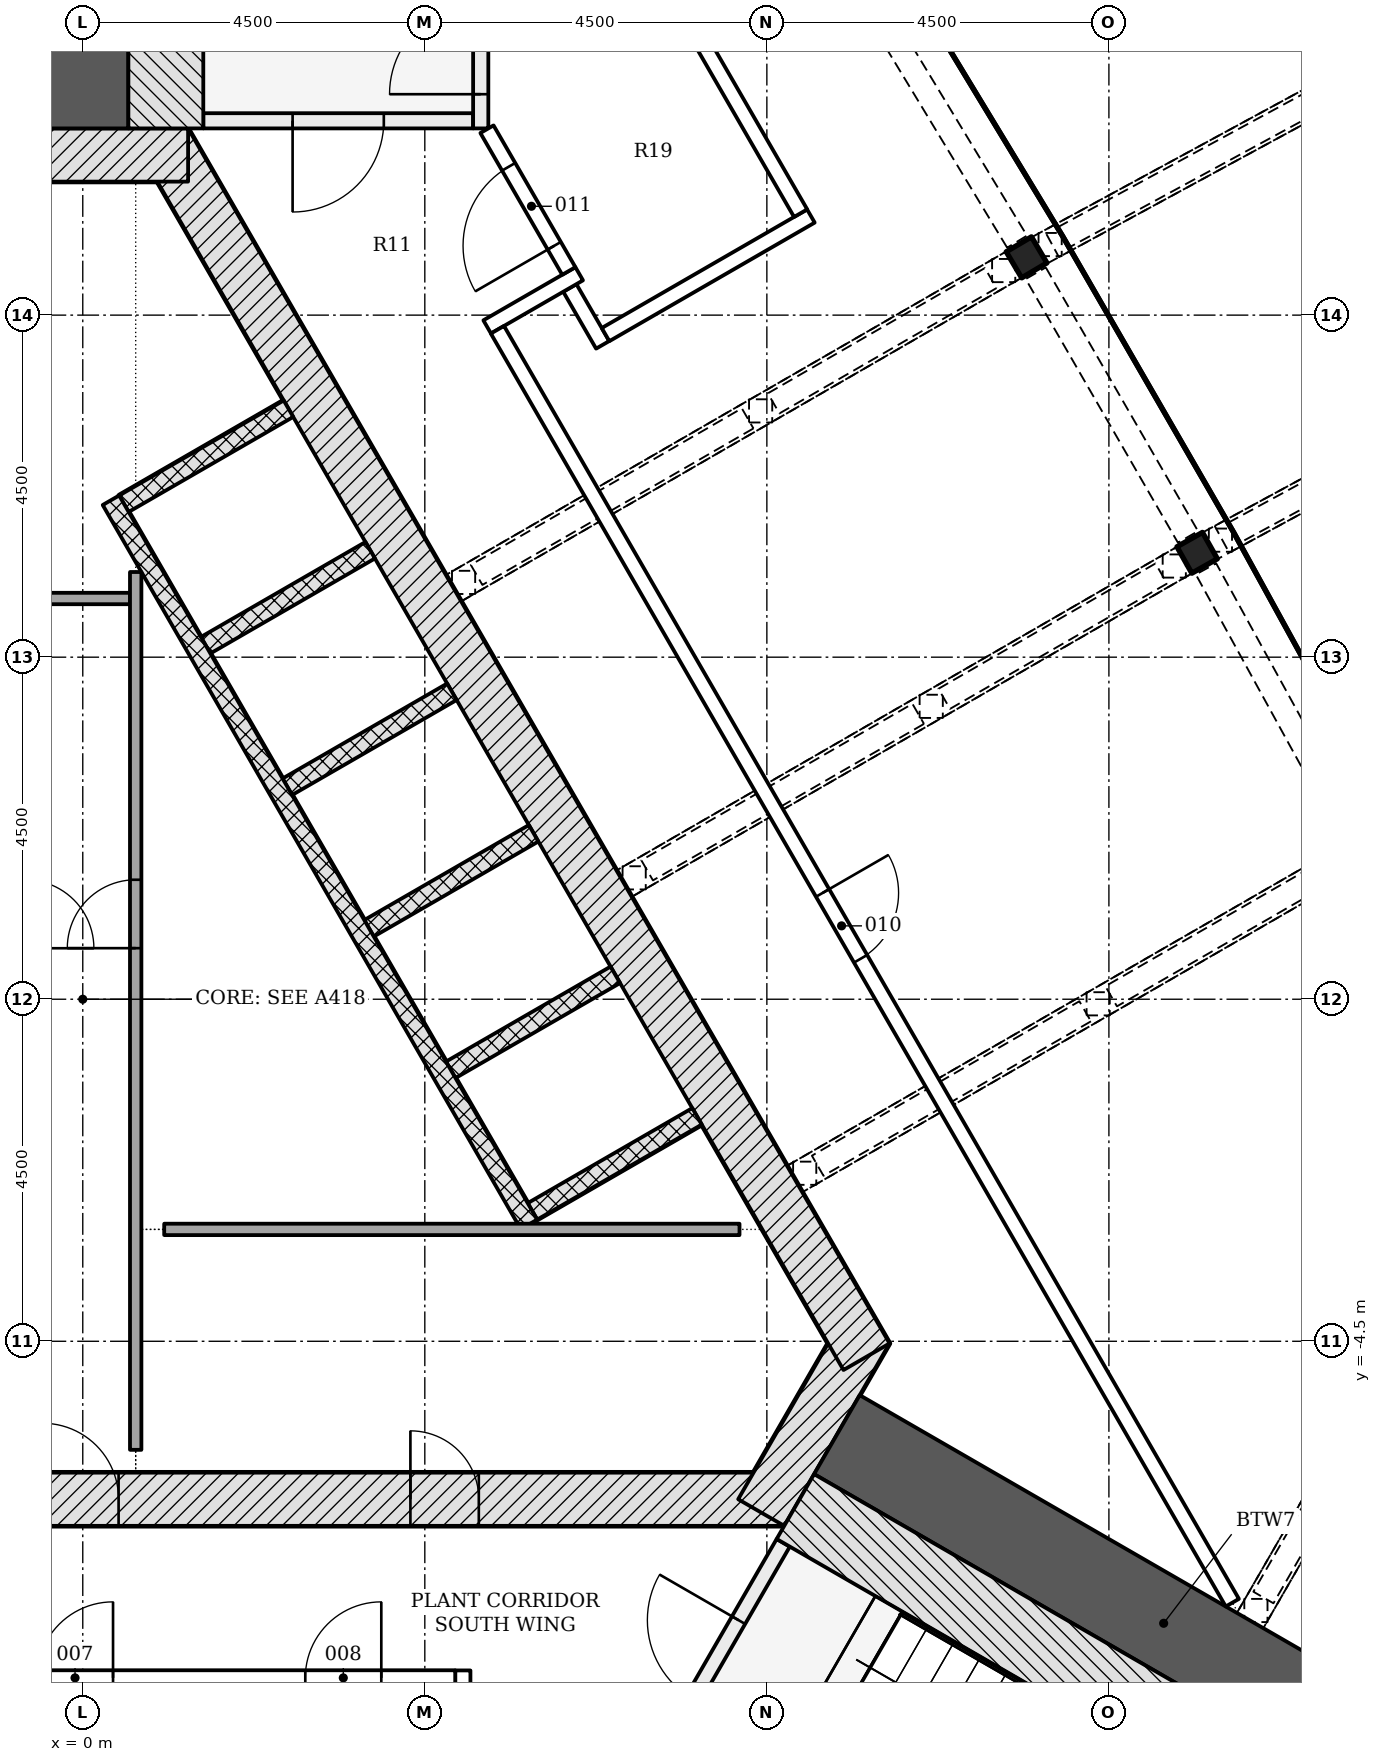
"""IFC4 building model, lengths in metres.
Left out: names, types, materials, properties, quantities, classifications, styles, units other than length and angle.
Written with IfcOpenShell. Run it as: python <this file> out.ifc"""

import sys

from ifc_helpers import new_model, si_unit, direction, frame, frame_2d, origin, origin_2d, place, context, subcontext, project, spatial, polyline, rectangle, i_section, outline, extrude, element, fill, save


model = new_model("IFC4")
c1 = context("Model", 3, precision=1e-05, world=origin(), true_north=direction((0.0, 1.0)))
c2 = subcontext(c1, "Body", "Model", "MODEL_VIEW")
j1 = project(units=[si_unit("LENGTHUNIT", "METRE"), si_unit("PLANEANGLEUNIT", "RADIAN")], contexts=[c1])
p1 = place(None, origin())
s1 = spatial("IfcSite", under=j1, at=p1, CompositionType="ELEMENT")
p2 = place(p1, origin())
s2 = spatial("IfcBuilding", under=s1, at=p2, CompositionType="ELEMENT")
p3 = place(p2, frame((0.0, 0.0, 168.9)))
s3 = spatial("IfcBuildingStorey", under=s2, at=p3, CompositionType="ELEMENT", Elevation=168.9)
p4 = place(p3, frame((-9.229, -6.578, -0.3), z_axis=(0.0, 0.0, 1.0), x_axis=(1.0, 0.0, 0.0)))
e1 = element("IfcWall", 1, at=p4, inside=s3, PredefinedType="SHEAR", context=c2, shape_type="SweptSolid", body=[
    extrude(rectangle(XDim=18.458, YDim=0.7, at=frame_2d((9.229, 0.0))), origin(), (0.0, 0.0, 1.0), 5.5),
])
p5 = place(p4, frame((8.7, 0.0, 0.3)))
e2 = element("IfcOpeningElement", 2, at=p5, cuts=e1, PredefinedType="OPENING", context=c2, shape_type="SweptSolid", body=[
    extrude(rectangle(XDim=1.0, YDim=2.1, at=frame_2d((0.5, 1.05))), frame((0.0, 0.36, 0.0), z_axis=(0.0, -1.0, 0.0), x_axis=(1.0, 0.0, 0.0)), (0.0, 0.0, 1.0), 0.72),
])
p6 = place(p4, frame((3.99, 0.0, 0.3)))
e3 = element("IfcOpeningElement", 3, at=p6, cuts=e1, PredefinedType="OPENING", context=c2, shape_type="SweptSolid", body=[
    extrude(rectangle(XDim=0.9, YDim=2.1, at=frame_2d((0.45, 1.05))), frame((0.0, 0.36, 0.0), z_axis=(0.0, -1.0, 0.0), x_axis=(1.0, 0.0, 0.0)), (0.0, 0.0, 1.0), 0.72),
])
p7 = place(p4, frame((13.539, 0.0, 0.3)))
e4 = element("IfcOpeningElement", 4, at=p7, cuts=e1, PredefinedType="OPENING", context=c2, shape_type="SweptSolid", body=[
    extrude(rectangle(XDim=0.9, YDim=2.1, at=frame_2d((0.45, 1.05))), frame((0.0, 0.36, 0.0), z_axis=(0.0, -1.0, 0.0), x_axis=(1.0, 0.0, 0.0)), (0.0, 0.0, 1.0), 0.72),
])
p8 = place(p3, frame((8.926, -6.753, -0.3), z_axis=(0.0, 0.0, 1.0), x_axis=(0.500042739161, 0.866000726912, 0.0)))
e5 = element("IfcWall", 5, at=p8, inside=s3, PredefinedType="SHEAR", context=c2, shape_type="SweptSolid", body=[
    extrude(rectangle(XDim=2.771, YDim=0.7, at=frame_2d((1.386, 0.0))), origin(), (0.0, 0.0, 1.0), 5.5),
])
p9 = place(p3, frame((10.311, -4.703, -0.3), z_axis=(0.0, 0.0, 1.0), x_axis=(-0.500001446645, 0.866024568562, 0.0)))
e6 = element("IfcWall", 6, at=p9, inside=s3, PredefinedType="SHEAR", context=c2, shape_type="SweptSolid", body=[
    extrude(rectangle(XDim=18.458, YDim=0.7, at=frame_2d((9.229, 0.0))), origin(), (0.0, 0.0, 1.0), 5.5),
])
p10 = place(p3, frame((1.386, 11.106, -0.3), z_axis=(0.0, 0.0, 1.0), x_axis=(-1.0, 0.0, 0.0)))
e7 = element("IfcWall", 7, at=p10, inside=s3, PredefinedType="SHEAR", context=c2, shape_type="SweptSolid", body=[
    extrude(rectangle(XDim=2.771, YDim=0.7, at=frame_2d((1.386, 0.0))), origin(), (0.0, 0.0, 1.0), 5.5),
])
p11 = place(p3, frame((0.0, 11.456, -0.3), z_axis=(0.0, 0.0, 1.0), x_axis=(0.0, 1.0, 0.0)))
e8 = element("IfcWall", 8, at=p11, inside=s3, PredefinedType="SHEAR", context=c2, shape_type="SweptSolid", body=[
    extrude(rectangle(XDim=9.928, YDim=1.2, at=frame_2d((4.964, 0.0))), origin(), (0.0, 0.0, 1.0), 5.5),
])
p12 = place(p3, frame((9.922, -5.728, -0.3), z_axis=(0.0, 0.0, 1.0), x_axis=(0.866029553954, -0.499992811627, 0.0)))
e9 = element("IfcWall", 9, at=p12, inside=s3, PredefinedType="SHEAR", context=c2, shape_type="SweptSolid", body=[
    extrude(rectangle(XDim=9.927, YDim=1.2, at=frame_2d((4.964, 0.0))), origin(), (0.0, 0.0, 1.0), 5.5),
])
for number, where, z_axis, x_axis in (
    (10, (14.661, 5.873, -0.3), (0.0, 0.0, 1.0), (-0.491, 0.871, 0.0)),
    (11, (12.417, 9.76, -0.3), (0.0, 0.0, 1.0), (-0.509, 0.861, 0.0)),
):
    element("IfcColumn", number, at=place(p3, frame(where, z_axis=z_axis, x_axis=x_axis)), inside=s3, PredefinedType="COLUMN", context=c2, shape_type="SweptSolid", body=[
        extrude(i_section(OverallWidth=0.399, OverallDepth=0.386, WebThickness=0.021, FlangeThickness=0.033, FilletRadius=0.015, at=origin_2d()), origin(), (0.0, 0.0, 1.0), 5.5),
    ])
p13 = place(p3, origin())
e12 = element("IfcWall", 12, at=p13, inside=s3, PredefinedType="NOTDEFINED", context=c2, shape_type="SweptSolid", body=[
    extrude(outline(polyline([(15.736, -15.612), (17.768, -15.451), (19.234, -15.121), (20.555, -14.405), (21.632, -13.357), (22.383, -12.055), (22.753, -10.599), (22.712, -9.097), (22.265, -7.662), (21.979, -7.751), (22.413, -9.146), (22.452, -10.565), (22.103, -11.941), (21.393, -13.171), (20.376, -14.161), (19.128, -14.837), (17.723, -15.154), (15.712, -15.312), (15.736, -15.612)])), origin(), (0.0, 0.0, 1.0), 5.2),
])
for number, where, z_axis, x_axis in (
    (13, (8.081, -1.541, -0.3), (0.0, 0.0, 1.0), (-0.866, -0.5, 0.0)),
    (14, (7.006, 0.321, -0.3), (0.0, 0.0, 1.0), (-0.866, -0.5, 0.0)),
):
    element("IfcWall", number, at=place(p3, frame(where, z_axis=z_axis, x_axis=x_axis)), inside=s3, PredefinedType="PARTITIONING", context=c2, shape_type="SweptSolid", body=[
        extrude(rectangle(XDim=2.5, YDim=0.25, at=frame_2d((1.25, 0.0))), origin(), (0.0, 0.0, 1.0), 5.5),
    ])
p14 = place(p3, frame((5.931, 2.183, -0.3), z_axis=(0.0, 0.0, 1.0), x_axis=(-0.866047370643, -0.499961950354, 0.0)))
e15 = element("IfcWall", 15, at=p14, inside=s3, PredefinedType="PARTITIONING", context=c2, shape_type="SweptSolid", body=[
    extrude(rectangle(XDim=2.5, YDim=0.25, at=frame_2d((1.25, 0.0))), origin(), (0.0, 0.0, 1.0), 5.5),
])
for number, where, z_axis, x_axis in (
    (16, (4.856, 4.045, -0.3), (0.0, 0.0, 1.0), (-0.866, -0.5, 0.0)),
    (17, (3.781, 5.907, -0.3), (0.0, 0.0, 1.0), (-0.866, -0.5, 0.0)),
    (18, (2.706, 7.769, -0.3), (0.0, 0.0, 1.0), (-0.866, -0.5, 0.0)),
):
    element("IfcWall", number, at=place(p3, frame(where, z_axis=z_axis, x_axis=x_axis)), inside=s3, PredefinedType="PARTITIONING", context=c2, shape_type="SweptSolid", body=[
        extrude(rectangle(XDim=2.5, YDim=0.25, at=frame_2d((1.25, 0.0))), origin(), (0.0, 0.0, 1.0), 5.5),
    ])
p15 = place(p3, frame((5.87, -2.961, 0.0), z_axis=(0.0, 0.0, 1.0), x_axis=(-0.50000615651, 0.866021849293, 0.0)))
e19 = element("IfcWall", 19, at=p15, inside=s3, PredefinedType="PARTITIONING", context=c2, shape_type="SweptSolid", body=[
    extrude(rectangle(XDim=11.0, YDim=0.25, at=frame_2d((5.5, 0.0))), origin(), (0.0, 0.0, 1.0), 5.2),
])
p16 = place(p3, frame((-0.679, 5.272, 0.0), z_axis=(0.0, 0.0, 1.0), x_axis=(1.0, 0.0, 0.0)))
e20 = element("IfcWall", 20, at=p16, inside=s3, PredefinedType="PARTITIONING", context=c2, shape_type="SweptSolid", body=[
    extrude(rectangle(XDim=1.3, YDim=0.15, at=frame_2d((0.65, 0.0))), origin(), (0.0, 0.0, 1.0), 5.2),
])
p17 = place(p3, frame((0.696, -5.928, 0.0), z_axis=(0.0, 0.0, 1.0), x_axis=(0.0, 1.0, 0.0)))
e21 = element("IfcWall", 21, at=p17, inside=s3, PredefinedType="PARTITIONING", context=c2, shape_type="SweptSolid", body=[
    extrude(rectangle(XDim=11.549, YDim=0.15, at=frame_2d((5.774, 0.0))), origin(), (0.0, 0.0, 1.0), 5.2),
])
p18 = place(p17, frame((6.6, 0.0, 0.0)))
e22 = element("IfcOpeningElement", 22, at=p18, cuts=e21, PredefinedType="OPENING", context=c2, shape_type="SweptSolid", body=[
    extrude(rectangle(XDim=0.9, YDim=2.1, at=frame_2d((0.45, 1.05))), frame((0.0, 0.085, 0.0), z_axis=(0.0, -1.0, 0.0), x_axis=(1.0, 0.0, 0.0)), (0.0, 0.0, 1.0), 0.17),
])
p19 = place(p3, frame((1.071, -3.028, 0.0), z_axis=(0.0, 0.0, 1.0), x_axis=(1.0, 0.0, 0.0)))
e23 = element("IfcWall", 23, at=p19, inside=s3, PredefinedType="PARTITIONING", context=c2, shape_type="SweptSolid", body=[
    extrude(rectangle(XDim=7.569, YDim=0.15, at=frame_2d((3.784, 0.0))), origin(), (0.0, 0.0, 1.0), 5.2),
])
p20 = place(p3, frame((5.135, 11.556, -0.3), z_axis=(0.0, 0.0, 1.0), x_axis=(-1.0, 0.0, 0.0)))
e24 = element("IfcWall", 24, at=p20, inside=s3, PredefinedType="SHEAR", context=c2, shape_type="SweptSolid", body=[
    extrude(rectangle(XDim=3.55, YDim=0.2, at=frame_2d((1.775, 0.0))), origin(), (0.0, 0.0, 1.0), 5.5),
])
p21 = place(p20, frame((1.175, 0.0, 0.3)))
e25 = element("IfcOpeningElement", 25, at=p21, cuts=e24, PredefinedType="OPENING", context=c2, shape_type="SweptSolid", body=[
    extrude(rectangle(XDim=1.2, YDim=2.1, at=frame_2d((0.6, 1.05))), frame((0.0, 0.11, 0.0), z_axis=(0.0, -1.0, 0.0), x_axis=(1.0, 0.0, 0.0)), (0.0, 0.0, 1.0), 0.22),
])
p22 = place(p3, frame((5.236, 11.456, -0.3), z_axis=(0.0, 0.0, 1.0), x_axis=(0.0, 1.0, 0.0)))
e26 = element("IfcWall", 26, at=p22, inside=s3, PredefinedType="SHEAR", context=c2, shape_type="SweptSolid", body=[
    extrude(rectangle(XDim=5.6, YDim=0.2, at=frame_2d((2.8, 0.0))), origin(), (0.0, 0.0, 1.0), 5.5),
])
p23 = place(p22, frame((0.45, 0.0, 0.3)))
e27 = element("IfcOpeningElement", 27, at=p23, cuts=e26, PredefinedType="OPENING", context=c2, shape_type="SweptSolid", body=[
    extrude(rectangle(XDim=1.2, YDim=2.1, at=frame_2d((0.6, 1.05))), frame((0.0, 0.11, 0.0), z_axis=(0.0, -1.0, 0.0), x_axis=(1.0, 0.0, 0.0)), (0.0, 0.0, 1.0), 0.22),
])
p24 = place(p3, frame((1.093, 11.456, -0.3), z_axis=(0.0, 0.0, 1.0), x_axis=(0.0, 1.0, 0.0)))
e28 = element("IfcWall", 28, at=p24, inside=s3, PredefinedType="SHEAR", context=c2, shape_type="SweptSolid", body=[
    extrude(rectangle(XDim=7.2, YDim=0.986, at=frame_2d((3.6, 0.0))), origin(), (0.0, 0.0, 1.0), 5.5),
])
p25 = place(p3, frame((7.44, -10.226, -0.3), z_axis=(0.0, 0.0, 1.0), x_axis=(0.500022077904, 0.866012656725, 0.0)))
e29 = element("IfcWall", 29, at=p25, inside=s3, PredefinedType="SHEAR", context=c2, shape_type="SweptSolid", body=[
    extrude(rectangle(XDim=3.55, YDim=0.2, at=frame_2d((1.775, 0.0))), origin(), (0.0, 0.0, 1.0), 5.5),
])
p26 = place(p25, frame((1.175, 0.0, 0.3)))
e30 = element("IfcOpeningElement", 30, at=p26, cuts=e29, PredefinedType="OPENING", context=c2, shape_type="SweptSolid", body=[
    extrude(rectangle(XDim=1.2, YDim=2.1, at=frame_2d((0.6, 1.05))), frame((0.0, 0.11, 0.0), z_axis=(0.0, -1.0, 0.0), x_axis=(1.0, 0.0, 0.0)), (0.0, 0.0, 1.0), 0.22),
])
p27 = place(p3, frame((9.375, -6.675, -0.3), z_axis=(0.0, 0.0, 1.0), x_axis=(0.866026919366, -0.499997374926, 0.0)))
e31 = element("IfcWall", 31, at=p27, inside=s3, PredefinedType="SHEAR", context=c2, shape_type="SweptSolid", body=[
    extrude(rectangle(XDim=7.2, YDim=0.986, at=frame_2d((3.6, 0.0))), origin(), (0.0, 0.0, 1.0), 5.5),
])
p28 = place(p3, frame((5.0, -10.428, 0.0), z_axis=(0.0, 0.0, 1.0), x_axis=(0.0, 1.0, 0.0)))
e32 = element("IfcWall", 32, at=p28, inside=s3, PredefinedType="PARTITIONING", context=c2, shape_type="SweptSolid", body=[
    extrude(rectangle(XDim=1.598, YDim=0.2, at=frame_2d((0.799, 0.0))), origin(), (0.0, 0.0, 1.0), 5.2),
])
p29 = place(p3, frame((-14.091, -8.928, 0.0), z_axis=(0.0, 0.0, 1.0), x_axis=(1.0, 0.0, 0.0)))
e33 = element("IfcWall", 33, at=p29, inside=s3, PredefinedType="PARTITIONING", context=c2, shape_type="SweptSolid", body=[
    extrude(rectangle(XDim=18.991, YDim=0.2, at=frame_2d((9.495, 0.0))), origin(), (0.0, 0.0, 1.0), 4.647),
])
p30 = place(p29, frame((5.474, 0.0, 0.0)))
e34 = element("IfcOpeningElement", 34, at=p30, cuts=e33, PredefinedType="OPENING", context=c2, shape_type="SweptSolid", body=[
    extrude(rectangle(XDim=1.0, YDim=2.1, at=frame_2d((0.5, 1.05))), frame((0.0, 0.11, 0.0), z_axis=(0.0, -1.0, 0.0), x_axis=(1.0, 0.0, 0.0)), (0.0, 0.0, 1.0), 0.22),
])
p31 = place(p29, frame((13.489, 0.0, 0.0)))
e35 = element("IfcOpeningElement", 35, at=p31, cuts=e33, PredefinedType="OPENING", context=c2, shape_type="SweptSolid", body=[
    extrude(rectangle(XDim=1.0, YDim=2.1, at=frame_2d((0.5, 1.05))), frame((0.0, 0.11, 0.0), z_axis=(0.0, -1.0, 0.0), x_axis=(1.0, 0.0, 0.0)), (0.0, 0.0, 1.0), 0.22),
])
p32 = place(p29, frame((17.018, 0.0, 0.0)))
e36 = element("IfcOpeningElement", 36, at=p32, cuts=e33, PredefinedType="OPENING", context=c2, shape_type="SweptSolid", body=[
    extrude(rectangle(XDim=1.0, YDim=2.1, at=frame_2d((0.5, 1.05))), frame((0.0, 0.11, 0.0), z_axis=(0.0, -1.0, 0.0), x_axis=(1.0, 0.0, 0.0)), (0.0, 0.0, 1.0), 0.22),
])
p33 = place(p3, frame((6.408, 9.358, 0.0), z_axis=(0.0, 0.0, 1.0), x_axis=(0.49996696679, -0.866044474677, 0.0)))
e37 = element("IfcWall", 37, at=p33, inside=s3, PredefinedType="PARTITIONING", context=c2, shape_type="SweptSolid", body=[
    extrude(rectangle(XDim=0.864, YDim=0.2, at=frame_2d((0.432, 0.0))), origin(), (0.0, 0.0, 1.0), 5.2),
])
p34 = place(p3, frame((5.32, 8.845, 0.0), z_axis=(0.0, 0.0, 1.0), x_axis=(0.866031452229, 0.49998952364, 0.0)))
e38 = element("IfcWall", 38, at=p34, inside=s3, PredefinedType="PARTITIONING", context=c2, shape_type="SweptSolid", body=[
    extrude(rectangle(XDim=1.398, YDim=0.2, at=frame_2d((0.699, 0.0))), origin(), (0.0, 0.0, 1.0), 5.2),
])
p35 = place(p3, frame((6.395, 9.581, 0.0), z_axis=(0.0, 0.0, 1.0), x_axis=(-0.500003735859, 0.866023246874, 0.0)))
e39 = element("IfcWall", 39, at=p35, inside=s3, PredefinedType="PARTITIONING", context=c2, shape_type="SweptSolid", body=[
    extrude(rectangle(XDim=2.154, YDim=0.2, at=frame_2d((1.077, 0.0))), origin(), (0.0, 0.0, 1.0), 4.647),
])
p36 = place(p35, frame((0.383, 0.0, 0.0)))
e40 = element("IfcOpeningElement", 40, at=p36, cuts=e39, PredefinedType="OPENING", context=c2, shape_type="SweptSolid", body=[
    extrude(rectangle(XDim=1.2, YDim=2.1, at=frame_2d((0.6, 1.05))), frame((0.0, 0.11, 0.0), z_axis=(0.0, -1.0, 0.0), x_axis=(1.0, 0.0, 0.0)), (0.0, 0.0, 1.0), 0.22),
])
p37 = place(p3, frame((5.455, 8.808, 0.0), z_axis=(0.0, 0.0, 1.0), x_axis=(0.49999276215, -0.866029582519, 0.0)))
e41 = element("IfcWall", 41, at=p37, inside=s3, PredefinedType="PARTITIONING", context=c2, shape_type="SweptSolid", body=[
    extrude(rectangle(XDim=19.337, YDim=0.2, at=frame_2d((9.668, 0.0))), origin(), (0.0, 0.0, 1.0), 5.2),
])
p38 = place(p37, frame((8.556, 0.0, 0.0)))
e42 = element("IfcOpeningElement", 42, at=p38, cuts=e41, PredefinedType="OPENING", context=c2, shape_type="SweptSolid", body=[
    extrude(rectangle(XDim=1.0, YDim=2.1, at=frame_2d((0.5, 1.05))), frame((0.0, 0.11, 0.0), z_axis=(0.0, -1.0, 0.0), x_axis=(1.0, 0.0, 0.0)), (0.0, 0.0, 1.0), 0.22),
])
p39 = place(p3, frame((6.878, 8.744, 0.0), z_axis=(0.0, 0.0, 1.0), x_axis=(0.866023983177, 0.500002460556, 0.0)))
e43 = element("IfcWall", 43, at=p39, inside=s3, PredefinedType="PARTITIONING", context=c2, shape_type="SweptSolid", body=[
    extrude(rectangle(XDim=3.12, YDim=0.2, at=frame_2d((1.56, 0.0))), origin(), (0.0, 0.0, 1.0), 5.2),
])
p40 = place(p3, frame((6.566, 15.327, 0.0), z_axis=(0.0, 0.0, 1.0), x_axis=(0.499997778408, -0.866026686418, 0.0)))
e44 = element("IfcWall", 44, at=p40, inside=s3, PredefinedType="PARTITIONING", context=c2, shape_type="SweptSolid", body=[
    extrude(rectangle(XDim=5.757, YDim=0.2, at=frame_2d((2.878, 0.0))), origin(), (0.0, 0.0, 1.0), 4.647),
])
p41 = place(p5, origin())
e45 = element("IfcDoor", 45, at=p41, inside=s3, OperationType="SINGLE_SWING_LEFT", PredefinedType="DOOR", context=c2, shape_type="SweptSolid", body=[
    extrude(rectangle(XDim=1.0, YDim=2.1, at=frame_2d((0.5, 1.05))), frame((0.0, 0.075, 0.0), z_axis=(0.0, -1.0, 0.0), x_axis=(1.0, 0.0, 0.0)), (0.0, 0.0, 1.0), 0.15),
])
fill(e2, e45)
p42 = place(p7, origin())
e46 = element("IfcDoor", 46, at=p42, inside=s3, OperationType="SINGLE_SWING_LEFT", PredefinedType="DOOR", context=c2, shape_type="SweptSolid", body=[
    extrude(rectangle(XDim=0.9, YDim=2.1, at=frame_2d((0.45, 1.05))), frame((0.0, 0.075, 0.0), z_axis=(0.0, -1.0, 0.0), x_axis=(1.0, 0.0, 0.0)), (0.0, 0.0, 1.0), 0.15),
])
fill(e4, e46)
p43 = place(p18, origin())
e47 = element("IfcDoor", 47, at=p43, inside=s3, OperationType="SINGLE_SWING_LEFT", PredefinedType="DOOR", context=c2, shape_type="SweptSolid", body=[
    extrude(rectangle(XDim=0.9, YDim=2.1, at=frame_2d((0.45, 1.05))), frame((0.0, 0.025, 0.0), z_axis=(0.0, -1.0, 0.0), x_axis=(1.0, 0.0, 0.0)), (0.0, 0.0, 1.0), 0.05),
])
fill(e22, e47)
p44 = place(p21, origin())
e48 = element("IfcDoor", 48, at=p44, inside=s3, OperationType="SINGLE_SWING_RIGHT", PredefinedType="DOOR", context=c2, shape_type="SweptSolid", body=[
    extrude(rectangle(XDim=1.2, YDim=2.1, at=frame_2d((0.6, 1.05))), frame((0.0, 0.025, 0.0), z_axis=(0.0, -1.0, 0.0), x_axis=(1.0, 0.0, 0.0)), (0.0, 0.0, 1.0), 0.05),
])
fill(e25, e48)
p45 = place(p23, origin())
e49 = element("IfcDoor", 49, at=p45, inside=s3, OperationType="SINGLE_SWING_LEFT", PredefinedType="DOOR", context=c2, shape_type="SweptSolid", body=[
    extrude(rectangle(XDim=1.2, YDim=2.1, at=frame_2d((0.6, 1.05))), frame((0.0, 0.025, 0.0), z_axis=(0.0, -1.0, 0.0), x_axis=(1.0, 0.0, 0.0)), (0.0, 0.0, 1.0), 0.05),
])
fill(e27, e49)
p46 = place(p26, origin())
e50 = element("IfcDoor", 50, at=p46, inside=s3, OperationType="SINGLE_SWING_RIGHT", PredefinedType="DOOR", context=c2, shape_type="SweptSolid", body=[
    extrude(rectangle(XDim=1.2, YDim=2.1, at=frame_2d((0.6, 1.05))), frame((0.0, 0.025, 0.0), z_axis=(0.0, -1.0, 0.0), x_axis=(1.0, 0.0, 0.0)), (0.0, 0.0, 1.0), 0.05),
])
fill(e30, e50)
p47 = place(p31, origin())
e51 = element("IfcDoor", 51, at=p47, inside=s3, OperationType="SINGLE_SWING_RIGHT", PredefinedType="DOOR", context=c2, shape_type="SweptSolid", body=[
    extrude(rectangle(XDim=1.0, YDim=2.1, at=frame_2d((0.5, 1.05))), frame((0.0, 0.025, 0.0), z_axis=(0.0, -1.0, 0.0), x_axis=(1.0, 0.0, 0.0)), (0.0, 0.0, 1.0), 0.05),
])
fill(e35, e51)
p48 = place(p32, origin())
e52 = element("IfcDoor", 52, at=p48, inside=s3, OperationType="SINGLE_SWING_RIGHT", PredefinedType="DOOR", context=c2, shape_type="SweptSolid", body=[
    extrude(rectangle(XDim=1.0, YDim=2.1, at=frame_2d((0.5, 1.05))), frame((0.0, 0.025, 0.0), z_axis=(0.0, -1.0, 0.0), x_axis=(1.0, 0.0, 0.0)), (0.0, 0.0, 1.0), 0.05),
])
fill(e36, e52)
p49 = place(p38, origin())
e53 = element("IfcDoor", 53, at=p49, inside=s3, OperationType="SINGLE_SWING_LEFT", PredefinedType="DOOR", context=c2, shape_type="SweptSolid", body=[
    extrude(rectangle(XDim=1.0, YDim=2.1, at=frame_2d((0.5, 1.05))), frame((0.0, 0.025, 0.0), z_axis=(0.0, -1.0, 0.0), x_axis=(1.0, 0.0, 0.0)), (0.0, 0.0, 1.0), 0.05),
])
fill(e42, e53)
p50 = place(p36, origin())
e54 = element("IfcDoor", 54, at=p50, inside=s3, OperationType="SINGLE_SWING_LEFT", PredefinedType="DOOR", context=c2, shape_type="SweptSolid", body=[
    extrude(rectangle(XDim=1.2, YDim=2.1, at=frame_2d((0.6, 1.05))), frame((0.0, 0.025, 0.0), z_axis=(0.0, -1.0, 0.0), x_axis=(1.0, 0.0, 0.0)), (0.0, 0.0, 1.0), 0.05),
])
fill(e40, e54)
save(model, sys.argv[1])
